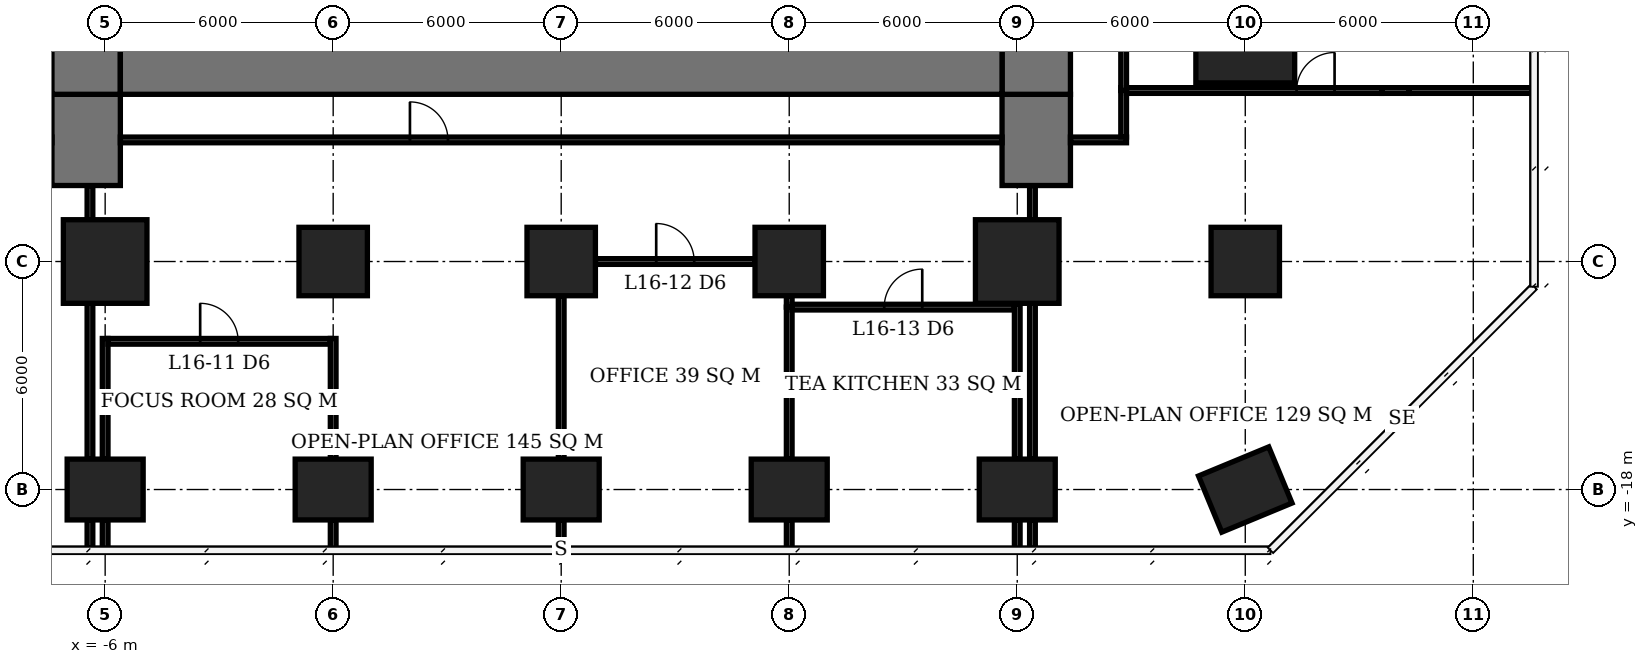
"""IFC4 building model, lengths in metres.
Left out: names, types, materials, properties, quantities, classifications, styles, units other than length and angle.
Written with IfcOpenShell. Run it as: python <this file> out.ifc"""

import sys

from ifc_helpers import new_model, si_unit, direction, frame, frame_2d, origin, origin_2d, place, context, subcontext, project, spatial, rectangle, extrude, element, fill, save


model = new_model("IFC4")
c1 = context("Model", 3, precision=1e-05, world=origin(), true_north=direction((0.0, 1.0)))
c2 = subcontext(c1, "Body", "Model", "MODEL_VIEW")
j1 = project(units=[si_unit("LENGTHUNIT", "METRE"), si_unit("PLANEANGLEUNIT", "RADIAN")], contexts=[c1])
p1 = place(None, origin())
s1 = spatial("IfcSite", under=j1, at=p1, CompositionType="ELEMENT")
p2 = place(p1, origin())
s2 = spatial("IfcBuilding", under=s1, at=p2, CompositionType="ELEMENT")
p3 = place(p2, frame((0.0, 0.0, 68.9)))
s3 = spatial("IfcBuildingStorey", under=s2, at=p3, CompositionType="ELEMENT", Elevation=68.9)
p4 = place(p3, frame((-6.0, -18.0, 0.0), z_axis=(0.0, 0.0, 1.0), x_axis=(1.0, 0.0, 0.0)))
e1 = element("IfcColumn", 1, at=p4, inside=s3, PredefinedType="COLUMN", context=c2, shape_type="SweptSolid", body=[
    extrude(rectangle(XDim=2.0, YDim=1.6, at=origin_2d()), origin(), (0.0, 0.0, 1.0), 3.9),
])
p5 = place(p3, frame((-6.0, -12.0, 0.0), z_axis=(0.0, 0.0, 1.0), x_axis=(1.0, 0.0, 0.0)))
e2 = element("IfcColumn", 2, at=p5, inside=s3, PredefinedType="COLUMN", context=c2, shape_type="SweptSolid", body=[
    extrude(rectangle(XDim=2.2, YDim=2.2, at=origin_2d()), origin(), (0.0, 0.0, 1.0), 3.9),
])
p6 = place(p3, frame((0.0, -18.0, 0.0), z_axis=(0.0, 0.0, 1.0), x_axis=(1.0, 0.0, 0.0)))
e3 = element("IfcColumn", 3, at=p6, inside=s3, PredefinedType="COLUMN", context=c2, shape_type="SweptSolid", body=[
    extrude(rectangle(XDim=2.0, YDim=1.6, at=origin_2d()), origin(), (0.0, 0.0, 1.0), 3.9),
])
p7 = place(p3, frame((0.0, -12.0, 0.0), z_axis=(0.0, 0.0, 1.0), x_axis=(1.0, 0.0, 0.0)))
e4 = element("IfcColumn", 4, at=p7, inside=s3, PredefinedType="COLUMN", context=c2, shape_type="SweptSolid", body=[
    extrude(rectangle(XDim=1.8, YDim=1.8, at=origin_2d()), origin(), (0.0, 0.0, 1.0), 3.9),
])
p8 = place(p3, frame((6.0, -18.0, 0.0), z_axis=(0.0, 0.0, 1.0), x_axis=(1.0, 0.0, 0.0)))
e5 = element("IfcColumn", 5, at=p8, inside=s3, PredefinedType="COLUMN", context=c2, shape_type="SweptSolid", body=[
    extrude(rectangle(XDim=2.0, YDim=1.6, at=origin_2d()), origin(), (0.0, 0.0, 1.0), 3.9),
])
p9 = place(p3, frame((6.0, -12.0, 0.0), z_axis=(0.0, 0.0, 1.0), x_axis=(1.0, 0.0, 0.0)))
e6 = element("IfcColumn", 6, at=p9, inside=s3, PredefinedType="COLUMN", context=c2, shape_type="SweptSolid", body=[
    extrude(rectangle(XDim=1.8, YDim=1.8, at=origin_2d()), origin(), (0.0, 0.0, 1.0), 3.9),
])
p10 = place(p3, frame((12.0, -18.0, 0.0), z_axis=(0.0, 0.0, 1.0), x_axis=(1.0, 0.0, 0.0)))
e7 = element("IfcColumn", 7, at=p10, inside=s3, PredefinedType="COLUMN", context=c2, shape_type="SweptSolid", body=[
    extrude(rectangle(XDim=2.0, YDim=1.6, at=origin_2d()), origin(), (0.0, 0.0, 1.0), 3.9),
])
p11 = place(p3, frame((12.0, -12.0, 0.0), z_axis=(0.0, 0.0, 1.0), x_axis=(1.0, 0.0, 0.0)))
e8 = element("IfcColumn", 8, at=p11, inside=s3, PredefinedType="COLUMN", context=c2, shape_type="SweptSolid", body=[
    extrude(rectangle(XDim=1.8, YDim=1.8, at=origin_2d()), origin(), (0.0, 0.0, 1.0), 3.9),
])
p12 = place(p3, frame((18.0, -18.0, 0.0), z_axis=(0.0, 0.0, 1.0), x_axis=(1.0, 0.0, 0.0)))
e9 = element("IfcColumn", 9, at=p12, inside=s3, PredefinedType="COLUMN", context=c2, shape_type="SweptSolid", body=[
    extrude(rectangle(XDim=2.0, YDim=1.6, at=origin_2d()), origin(), (0.0, 0.0, 1.0), 3.9),
])
p13 = place(p3, frame((18.0, -12.0, 0.0), z_axis=(0.0, 0.0, 1.0), x_axis=(1.0, 0.0, 0.0)))
e10 = element("IfcColumn", 10, at=p13, inside=s3, PredefinedType="COLUMN", context=c2, shape_type="SweptSolid", body=[
    extrude(rectangle(XDim=2.2, YDim=2.2, at=origin_2d()), origin(), (0.0, 0.0, 1.0), 3.9),
])
p14 = place(p3, frame((24.0, -18.0, 0.0), z_axis=(0.0, 0.0, 1.0), x_axis=(-0.923879532511, -0.382683432365, 0.0)))
e11 = element("IfcColumn", 11, at=p14, inside=s3, PredefinedType="COLUMN", context=c2, shape_type="SweptSolid", body=[
    extrude(rectangle(XDim=2.0, YDim=1.6, at=origin_2d()), origin(), (0.0, 0.0, 1.0), 3.9),
])
p15 = place(p3, frame((24.0, -12.0, 0.0), z_axis=(0.0, 0.0, 1.0), x_axis=(1.0, 0.0, 0.0)))
e12 = element("IfcColumn", 12, at=p15, inside=s3, PredefinedType="COLUMN", context=c2, shape_type="SweptSolid", body=[
    extrude(rectangle(XDim=1.8, YDim=1.8, at=origin_2d()), origin(), (0.0, 0.0, 1.0), 3.9),
])
p16 = place(p3, frame((24.0, -6.0, 0.0), z_axis=(0.0, 0.0, 1.0), x_axis=(1.0, 0.0, 0.0)))
e13 = element("IfcColumn", 13, at=p16, inside=s3, PredefinedType="COLUMN", context=c2, shape_type="SweptSolid", body=[
    extrude(rectangle(XDim=2.6, YDim=2.6, at=origin_2d()), origin(), (0.0, 0.0, 1.0), 3.9),
])
p17 = place(p3, frame((-5.6, -6.6, 0.0), z_axis=(0.0, 0.0, 1.0), x_axis=(1.0, 0.0, 0.0)))
e14 = element("IfcWall", 14, at=p17, inside=s3, PredefinedType="SHEAR", context=c2, shape_type="SweptSolid", body=[
    extrude(rectangle(XDim=23.2, YDim=2.0, at=frame_2d((11.6, 0.0))), origin(), (0.0, 0.0, 1.0), 3.9),
])
p18 = place(p3, frame((-6.5, -7.6, 0.0), z_axis=(0.0, 0.0, 1.0), x_axis=(0.0, 1.0, 0.0)))
e15 = element("IfcWall", 15, at=p18, inside=s3, PredefinedType="SHEAR", context=c2, shape_type="SweptSolid", body=[
    extrude(rectangle(XDim=21.2, YDim=1.8, at=frame_2d((10.6, 0.0))), origin(), (0.0, 0.0, 1.0), 3.9),
])
p19 = place(p18, frame((7.8, 0.0, 0.0)))
e16 = element("IfcOpeningElement", 16, at=p19, cuts=e15, PredefinedType="OPENING", context=c2, shape_type="SweptSolid", body=[
    extrude(rectangle(XDim=1.8, YDim=2.4, at=frame_2d((0.9, 1.2))), frame((0.0, 0.91, 0.0), z_axis=(0.0, -1.0, 0.0), x_axis=(1.0, 0.0, 0.0)), (0.0, 0.0, 1.0), 1.82),
])
p20 = place(p3, frame((18.5, -7.6, 0.0), z_axis=(0.0, 0.0, 1.0), x_axis=(0.0, 1.0, 0.0)))
e17 = element("IfcWall", 17, at=p20, inside=s3, PredefinedType="SHEAR", context=c2, shape_type="SweptSolid", body=[
    extrude(rectangle(XDim=21.2, YDim=1.8, at=frame_2d((10.6, 0.0))), origin(), (0.0, 0.0, 1.0), 3.9),
])
p21 = place(p20, frame((9.2, 0.0, 0.0)))
e18 = element("IfcOpeningElement", 18, at=p21, cuts=e17, PredefinedType="OPENING", context=c2, shape_type="SweptSolid", body=[
    extrude(rectangle(XDim=1.8, YDim=2.4, at=frame_2d((0.9, 1.2))), frame((0.0, 0.91, 0.0), z_axis=(0.0, -1.0, 0.0), x_axis=(1.0, 0.0, 0.0)), (0.0, 0.0, 1.0), 1.82),
])
for number, where, z_axis, x_axis in (
    (19, (-6.5, -10.0, 0.0), (0.0, 0.0, 1.0), (0.0, 1.0, 0.0)),
    (20, (18.5, -10.0, 0.0), (0.0, 0.0, 1.0), (0.0, 1.0, 0.0)),
):
    element("IfcWall", number, at=place(p3, frame(where, z_axis=z_axis, x_axis=x_axis)), inside=s3, PredefinedType="SHEAR", context=c2, shape_type="SweptSolid", body=[
        extrude(rectangle(XDim=2.4, YDim=1.8, at=frame_2d((1.2, 0.0))), origin(), (0.0, 0.0, 1.0), 3.9),
    ])
p22 = place(p3, frame((-5.925, -14.1, 0.0), z_axis=(0.0, 0.0, 1.0), x_axis=(1.0, 0.0, 0.0)))
e21 = element("IfcWall", 21, at=p22, inside=s3, PredefinedType="PARTITIONING", context=c2, shape_type="SweptSolid", body=[
    extrude(rectangle(XDim=5.85, YDim=0.15, at=frame_2d((2.925, 0.0))), origin(), (0.0, 0.0, 1.0), 3.65),
])
p23 = place(p22, frame((2.425, 0.0, 0.0)))
e22 = element("IfcOpeningElement", 22, at=p23, cuts=e21, PredefinedType="OPENING", context=c2, shape_type="SweptSolid", body=[
    extrude(rectangle(XDim=1.0, YDim=2.1, at=frame_2d((0.5, 1.05))), frame((0.0, 0.085, 0.0), z_axis=(0.0, -1.0, 0.0), x_axis=(1.0, 0.0, 0.0)), (0.0, 0.0, 1.0), 0.17),
])
p24 = place(p3, frame((12.075, -13.2, 0.0), z_axis=(0.0, 0.0, 1.0), x_axis=(1.0, 0.0, 0.0)))
e23 = element("IfcWall", 23, at=p24, inside=s3, PredefinedType="PARTITIONING", context=c2, shape_type="SweptSolid", body=[
    extrude(rectangle(XDim=5.85, YDim=0.15, at=frame_2d((2.925, 0.0))), origin(), (0.0, 0.0, 1.0), 3.65),
])
p25 = place(p24, frame((2.425, 0.0, 0.0)))
e24 = element("IfcOpeningElement", 24, at=p25, cuts=e23, PredefinedType="OPENING", context=c2, shape_type="SweptSolid", body=[
    extrude(rectangle(XDim=1.0, YDim=2.1, at=frame_2d((0.5, 1.05))), frame((0.0, 0.085, 0.0), z_axis=(0.0, -1.0, 0.0), x_axis=(1.0, 0.0, 0.0)), (0.0, 0.0, 1.0), 0.17),
])
p26 = place(p3, frame((6.9, -12.0, 0.0), z_axis=(0.0, 0.0, 1.0), x_axis=(1.0, 0.0, 0.0)))
e25 = element("IfcWall", 25, at=p26, inside=s3, PredefinedType="PARTITIONING", context=c2, shape_type="SweptSolid", body=[
    extrude(rectangle(XDim=4.2, YDim=0.15, at=frame_2d((2.1, 0.0))), origin(), (0.0, 0.0, 1.0), 3.65),
])
p27 = place(p26, frame((1.6, 0.0, 0.0)))
e26 = element("IfcOpeningElement", 26, at=p27, cuts=e25, PredefinedType="OPENING", context=c2, shape_type="SweptSolid", body=[
    extrude(rectangle(XDim=1.0, YDim=2.1, at=frame_2d((0.5, 1.05))), frame((0.0, 0.085, 0.0), z_axis=(0.0, -1.0, 0.0), x_axis=(1.0, 0.0, 0.0)), (0.0, 0.0, 1.0), 0.17),
])
p28 = place(p3, frame((-6.0, -19.6, 0.0), z_axis=(0.0, 0.0, 1.0), x_axis=(0.0, 1.0, 0.0)))
e27 = element("IfcWall", 27, at=p28, inside=s3, PredefinedType="PARTITIONING", context=c2, shape_type="SweptSolid", body=[
    extrude(rectangle(XDim=0.8, YDim=0.15, at=frame_2d((0.4, 0.0))), origin(), (0.0, 0.0, 1.0), 3.65),
])
p29 = place(p3, frame((-6.0, -17.2, 0.0), z_axis=(0.0, 0.0, 1.0), x_axis=(0.0, 1.0, 0.0)))
e28 = element("IfcWall", 28, at=p29, inside=s3, PredefinedType="PARTITIONING", context=c2, shape_type="SweptSolid", body=[
    extrude(rectangle(XDim=3.175, YDim=0.15, at=frame_2d((1.587, 0.0))), origin(), (0.0, 0.0, 1.0), 3.65),
])
p30 = place(p3, frame((0.0, -19.6, 0.0), z_axis=(0.0, 0.0, 1.0), x_axis=(0.0, 1.0, 0.0)))
e29 = element("IfcWall", 29, at=p30, inside=s3, PredefinedType="PARTITIONING", context=c2, shape_type="SweptSolid", body=[
    extrude(rectangle(XDim=0.8, YDim=0.15, at=frame_2d((0.4, 0.0))), origin(), (0.0, 0.0, 1.0), 3.65),
])
p31 = place(p3, frame((0.0, -17.2, 0.0), z_axis=(0.0, 0.0, 1.0), x_axis=(0.0, 1.0, 0.0)))
e30 = element("IfcWall", 30, at=p31, inside=s3, PredefinedType="PARTITIONING", context=c2, shape_type="SweptSolid", body=[
    extrude(rectangle(XDim=3.175, YDim=0.15, at=frame_2d((1.587, 0.0))), origin(), (0.0, 0.0, 1.0), 3.65),
])
p32 = place(p3, frame((6.0, -19.55, 0.0), z_axis=(0.0, 0.0, 1.0), x_axis=(0.0, 1.0, 0.0)))
e31 = element("IfcWall", 31, at=p32, inside=s3, PredefinedType="PARTITIONING", context=c2, shape_type="SweptSolid", body=[
    extrude(rectangle(XDim=0.75, YDim=0.15, at=frame_2d((0.375, 0.0))), origin(), (0.0, 0.0, 1.0), 3.65),
])
p33 = place(p3, frame((6.0, -17.2, 0.0), z_axis=(0.0, 0.0, 1.0), x_axis=(0.0, 1.0, 0.0)))
e32 = element("IfcWall", 32, at=p33, inside=s3, PredefinedType="PARTITIONING", context=c2, shape_type="SweptSolid", body=[
    extrude(rectangle(XDim=4.3, YDim=0.15, at=frame_2d((2.15, 0.0))), origin(), (0.0, 0.0, 1.0), 3.65),
])
p34 = place(p3, frame((12.0, -19.6, 0.0), z_axis=(0.0, 0.0, 1.0), x_axis=(0.0, 1.0, 0.0)))
e33 = element("IfcWall", 33, at=p34, inside=s3, PredefinedType="PARTITIONING", context=c2, shape_type="SweptSolid", body=[
    extrude(rectangle(XDim=0.8, YDim=0.15, at=frame_2d((0.4, 0.0))), origin(), (0.0, 0.0, 1.0), 3.65),
])
p35 = place(p3, frame((12.0, -17.2, 0.0), z_axis=(0.0, 0.0, 1.0), x_axis=(0.0, 1.0, 0.0)))
e34 = element("IfcWall", 34, at=p35, inside=s3, PredefinedType="PARTITIONING", context=c2, shape_type="SweptSolid", body=[
    extrude(rectangle(XDim=4.0, YDim=0.15, at=frame_2d((2.0, 0.0))), origin(), (0.0, 0.0, 1.0), 3.65),
])
p36 = place(p3, frame((12.0, -13.2, 0.0), z_axis=(0.0, 0.0, 1.0), x_axis=(0.0, 1.0, 0.0)))
e35 = element("IfcWall", 35, at=p36, inside=s3, PredefinedType="PARTITIONING", context=c2, shape_type="SweptSolid", body=[
    extrude(rectangle(XDim=0.3, YDim=0.15, at=frame_2d((0.15, 0.0))), origin(), (0.0, 0.0, 1.0), 3.65),
])
p37 = place(p3, frame((18.0, -19.6, 0.0), z_axis=(0.0, 0.0, 1.0), x_axis=(0.0, 1.0, 0.0)))
e36 = element("IfcWall", 36, at=p37, inside=s3, PredefinedType="PARTITIONING", context=c2, shape_type="SweptSolid", body=[
    extrude(rectangle(XDim=0.8, YDim=0.15, at=frame_2d((0.4, 0.0))), origin(), (0.0, 0.0, 1.0), 3.65),
])
p38 = place(p3, frame((18.0, -17.2, 0.0), z_axis=(0.0, 0.0, 1.0), x_axis=(0.0, 1.0, 0.0)))
e37 = element("IfcWall", 37, at=p38, inside=s3, PredefinedType="PARTITIONING", context=c2, shape_type="SweptSolid", body=[
    extrude(rectangle(XDim=4.075, YDim=0.15, at=frame_2d((2.038, 0.0))), origin(), (0.0, 0.0, 1.0), 3.65),
])
p39 = place(p3, frame((-6.4, -19.55, 0.0), z_axis=(0.0, 0.0, 1.0), x_axis=(0.0, 1.0, 0.0)))
e38 = element("IfcWall", 38, at=p39, inside=s3, PredefinedType="PARTITIONING", context=c2, shape_type="SweptSolid", body=[
    extrude(rectangle(XDim=0.75, YDim=0.15, at=frame_2d((0.375, 0.0))), origin(), (0.0, 0.0, 1.0), 3.65),
])
p40 = place(p3, frame((-6.4, -17.2, 0.0), z_axis=(0.0, 0.0, 1.0), x_axis=(0.0, 1.0, 0.0)))
e39 = element("IfcWall", 39, at=p40, inside=s3, PredefinedType="PARTITIONING", context=c2, shape_type="SweptSolid", body=[
    extrude(rectangle(XDim=4.1, YDim=0.15, at=frame_2d((2.05, 0.0))), origin(), (0.0, 0.0, 1.0), 3.65),
])
p41 = place(p3, frame((-6.4, -10.9, 0.0), z_axis=(0.0, 0.0, 1.0), x_axis=(0.0, 1.0, 0.0)))
e40 = element("IfcWall", 40, at=p41, inside=s3, PredefinedType="PARTITIONING", context=c2, shape_type="SweptSolid", body=[
    extrude(rectangle(XDim=0.9, YDim=0.15, at=frame_2d((0.45, 0.0))), origin(), (0.0, 0.0, 1.0), 3.65),
])
p42 = place(p3, frame((-5.6, -8.8, 0.0), z_axis=(0.0, 0.0, 1.0), x_axis=(1.0, 0.0, 0.0)))
e41 = element("IfcWall", 41, at=p42, inside=s3, PredefinedType="PARTITIONING", context=c2, shape_type="SweptSolid", body=[
    extrude(rectangle(XDim=23.2, YDim=0.15, at=frame_2d((11.6, 0.0))), origin(), (0.0, 0.0, 1.0), 3.65),
])
p43 = place(p42, frame((7.62, 0.0, 0.0)))
e42 = element("IfcOpeningElement", 42, at=p43, cuts=e41, PredefinedType="OPENING", context=c2, shape_type="SweptSolid", body=[
    extrude(rectangle(XDim=1.0, YDim=2.1, at=frame_2d((0.5, 1.05))), frame((0.0, 0.085, 0.0), z_axis=(0.0, -1.0, 0.0), x_axis=(1.0, 0.0, 0.0)), (0.0, 0.0, 1.0), 0.17),
])
p44 = place(p3, frame((18.4, -19.55, 0.0), z_axis=(0.0, 0.0, 1.0), x_axis=(0.0, 1.0, 0.0)))
e43 = element("IfcWall", 43, at=p44, inside=s3, PredefinedType="PARTITIONING", context=c2, shape_type="SweptSolid", body=[
    extrude(rectangle(XDim=0.75, YDim=0.15, at=frame_2d((0.375, 0.0))), origin(), (0.0, 0.0, 1.0), 3.65),
])
p45 = place(p3, frame((18.4, -17.2, 0.0), z_axis=(0.0, 0.0, 1.0), x_axis=(0.0, 1.0, 0.0)))
e44 = element("IfcWall", 44, at=p45, inside=s3, PredefinedType="PARTITIONING", context=c2, shape_type="SweptSolid", body=[
    extrude(rectangle(XDim=4.1, YDim=0.15, at=frame_2d((2.05, 0.0))), origin(), (0.0, 0.0, 1.0), 3.65),
])
p46 = place(p3, frame((18.4, -10.9, 0.0), z_axis=(0.0, 0.0, 1.0), x_axis=(0.0, 1.0, 0.0)))
e45 = element("IfcWall", 45, at=p46, inside=s3, PredefinedType="PARTITIONING", context=c2, shape_type="SweptSolid", body=[
    extrude(rectangle(XDim=0.9, YDim=0.15, at=frame_2d((0.45, 0.0))), origin(), (0.0, 0.0, 1.0), 3.65),
])
p47 = place(p3, frame((19.4, -8.8, 0.0), z_axis=(0.0, 0.0, 1.0), x_axis=(1.0, 0.0, 0.0)))
e46 = element("IfcWall", 46, at=p47, inside=s3, PredefinedType="PARTITIONING", context=c2, shape_type="SweptSolid", body=[
    extrude(rectangle(XDim=1.475, YDim=0.15, at=frame_2d((0.738, 0.0))), origin(), (0.0, 0.0, 1.0), 3.65),
])
p48 = place(p3, frame((20.8, -8.725, 0.0), z_axis=(0.0, 0.0, 1.0), x_axis=(0.0, 1.0, 0.0)))
e47 = element("IfcWall", 47, at=p48, inside=s3, PredefinedType="PARTITIONING", context=c2, shape_type="SweptSolid", body=[
    extrude(rectangle(XDim=1.3, YDim=0.15, at=frame_2d((0.65, 0.0))), origin(), (0.0, 0.0, 1.0), 3.65),
])
p49 = place(p3, frame((20.8, -7.5, 0.0), z_axis=(0.0, 0.0, 1.0), x_axis=(0.0, 1.0, 0.0)))
e48 = element("IfcWall", 48, at=p49, inside=s3, PredefinedType="PARTITIONING", context=c2, shape_type="SweptSolid", body=[
    extrude(rectangle(XDim=17.925, YDim=0.15, at=frame_2d((8.962, 0.0))), origin(), (0.0, 0.0, 1.0), 3.65),
])
p50 = place(p49, frame((11.2, 0.0, 0.0)))
e49 = element("IfcOpeningElement", 49, at=p50, cuts=e48, PredefinedType="OPENING", context=c2, shape_type="SweptSolid", body=[
    extrude(rectangle(XDim=1.0, YDim=2.1, at=frame_2d((0.5, 1.05))), frame((0.0, 0.085, 0.0), z_axis=(0.0, -1.0, 0.0), x_axis=(1.0, 0.0, 0.0)), (0.0, 0.0, 1.0), 0.17),
])
p51 = place(p3, frame((20.875, -7.5, 0.0), z_axis=(0.0, 0.0, 1.0), x_axis=(1.0, 0.0, 0.0)))
e50 = element("IfcWall", 50, at=p51, inside=s3, PredefinedType="PARTITIONING", context=c2, shape_type="SweptSolid", body=[
    extrude(rectangle(XDim=6.715, YDim=0.15, at=frame_2d((3.357, 0.0))), origin(), (0.0, 0.0, 1.0), 3.65),
])
p52 = place(p51, frame((4.475, 0.0, 0.0)))
e51 = element("IfcOpeningElement", 51, at=p52, cuts=e50, PredefinedType="OPENING", context=c2, shape_type="SweptSolid", body=[
    extrude(rectangle(XDim=1.0, YDim=2.1, at=frame_2d((0.5, 1.05))), frame((0.0, 0.085, 0.0), z_axis=(0.0, -1.0, 0.0), x_axis=(1.0, 0.0, 0.0)), (0.0, 0.0, 1.0), 0.17),
])
p53 = place(p3, frame((27.59, -7.5, 0.0), z_axis=(0.0, 0.0, 1.0), x_axis=(1.0, 0.0, 0.0)))
e52 = element("IfcWall", 52, at=p53, inside=s3, PredefinedType="PARTITIONING", context=c2, shape_type="SweptSolid", body=[
    extrude(rectangle(XDim=0.72, YDim=0.15, at=frame_2d((0.36, 0.0))), origin(), (0.0, 0.0, 1.0), 2.65),
])
p54 = place(p3, frame((28.31, -7.5, 0.0), z_axis=(0.0, 0.0, 1.0), x_axis=(1.0, 0.0, 0.0)))
e53 = element("IfcWall", 53, at=p54, inside=s3, PredefinedType="PARTITIONING", context=c2, shape_type="SweptSolid", body=[
    extrude(rectangle(XDim=3.29, YDim=0.15, at=frame_2d((1.645, 0.0))), origin(), (0.0, 0.0, 1.0), 3.65),
])
p55 = place(p23, origin())
e54 = element("IfcDoor", 54, at=p55, inside=s3, OperationType="SINGLE_SWING_LEFT", PredefinedType="DOOR", context=c2, shape_type="SweptSolid", body=[
    extrude(rectangle(XDim=1.0, YDim=2.1, at=frame_2d((0.5, 1.05))), frame((0.0, 0.025, 0.0), z_axis=(0.0, -1.0, 0.0), x_axis=(1.0, 0.0, 0.0)), (0.0, 0.0, 1.0), 0.05),
])
fill(e22, e54)
p56 = place(p27, origin())
e55 = element("IfcDoor", 55, at=p56, inside=s3, OperationType="SINGLE_SWING_LEFT", PredefinedType="DOOR", context=c2, shape_type="SweptSolid", body=[
    extrude(rectangle(XDim=1.0, YDim=2.1, at=frame_2d((0.5, 1.05))), frame((0.0, 0.025, 0.0), z_axis=(0.0, -1.0, 0.0), x_axis=(1.0, 0.0, 0.0)), (0.0, 0.0, 1.0), 0.05),
])
fill(e26, e55)
p57 = place(p25, origin())
e56 = element("IfcDoor", 56, at=p57, inside=s3, OperationType="SINGLE_SWING_RIGHT", PredefinedType="DOOR", context=c2, shape_type="SweptSolid", body=[
    extrude(rectangle(XDim=1.0, YDim=2.1, at=frame_2d((0.5, 1.05))), frame((0.0, 0.025, 0.0), z_axis=(0.0, -1.0, 0.0), x_axis=(1.0, 0.0, 0.0)), (0.0, 0.0, 1.0), 0.05),
])
fill(e24, e56)
p58 = place(p43, origin())
e57 = element("IfcDoor", 57, at=p58, inside=s3, OperationType="SINGLE_SWING_LEFT", PredefinedType="DOOR", context=c2, shape_type="SweptSolid", body=[
    extrude(rectangle(XDim=1.0, YDim=2.1, at=frame_2d((0.5, 1.05))), frame((0.0, 0.025, 0.0), z_axis=(0.0, -1.0, 0.0), x_axis=(1.0, 0.0, 0.0)), (0.0, 0.0, 1.0), 0.05),
])
fill(e42, e57)
p59 = place(p52, origin())
e58 = element("IfcDoor", 58, at=p59, inside=s3, OperationType="SINGLE_SWING_RIGHT", PredefinedType="DOOR", context=c2, shape_type="SweptSolid", body=[
    extrude(rectangle(XDim=1.0, YDim=2.1, at=frame_2d((0.5, 1.05))), frame((0.0, 0.025, 0.0), z_axis=(0.0, -1.0, 0.0), x_axis=(1.0, 0.0, 0.0)), (0.0, 0.0, 1.0), 0.05),
])
fill(e51, e58)
save(model, sys.argv[1])
